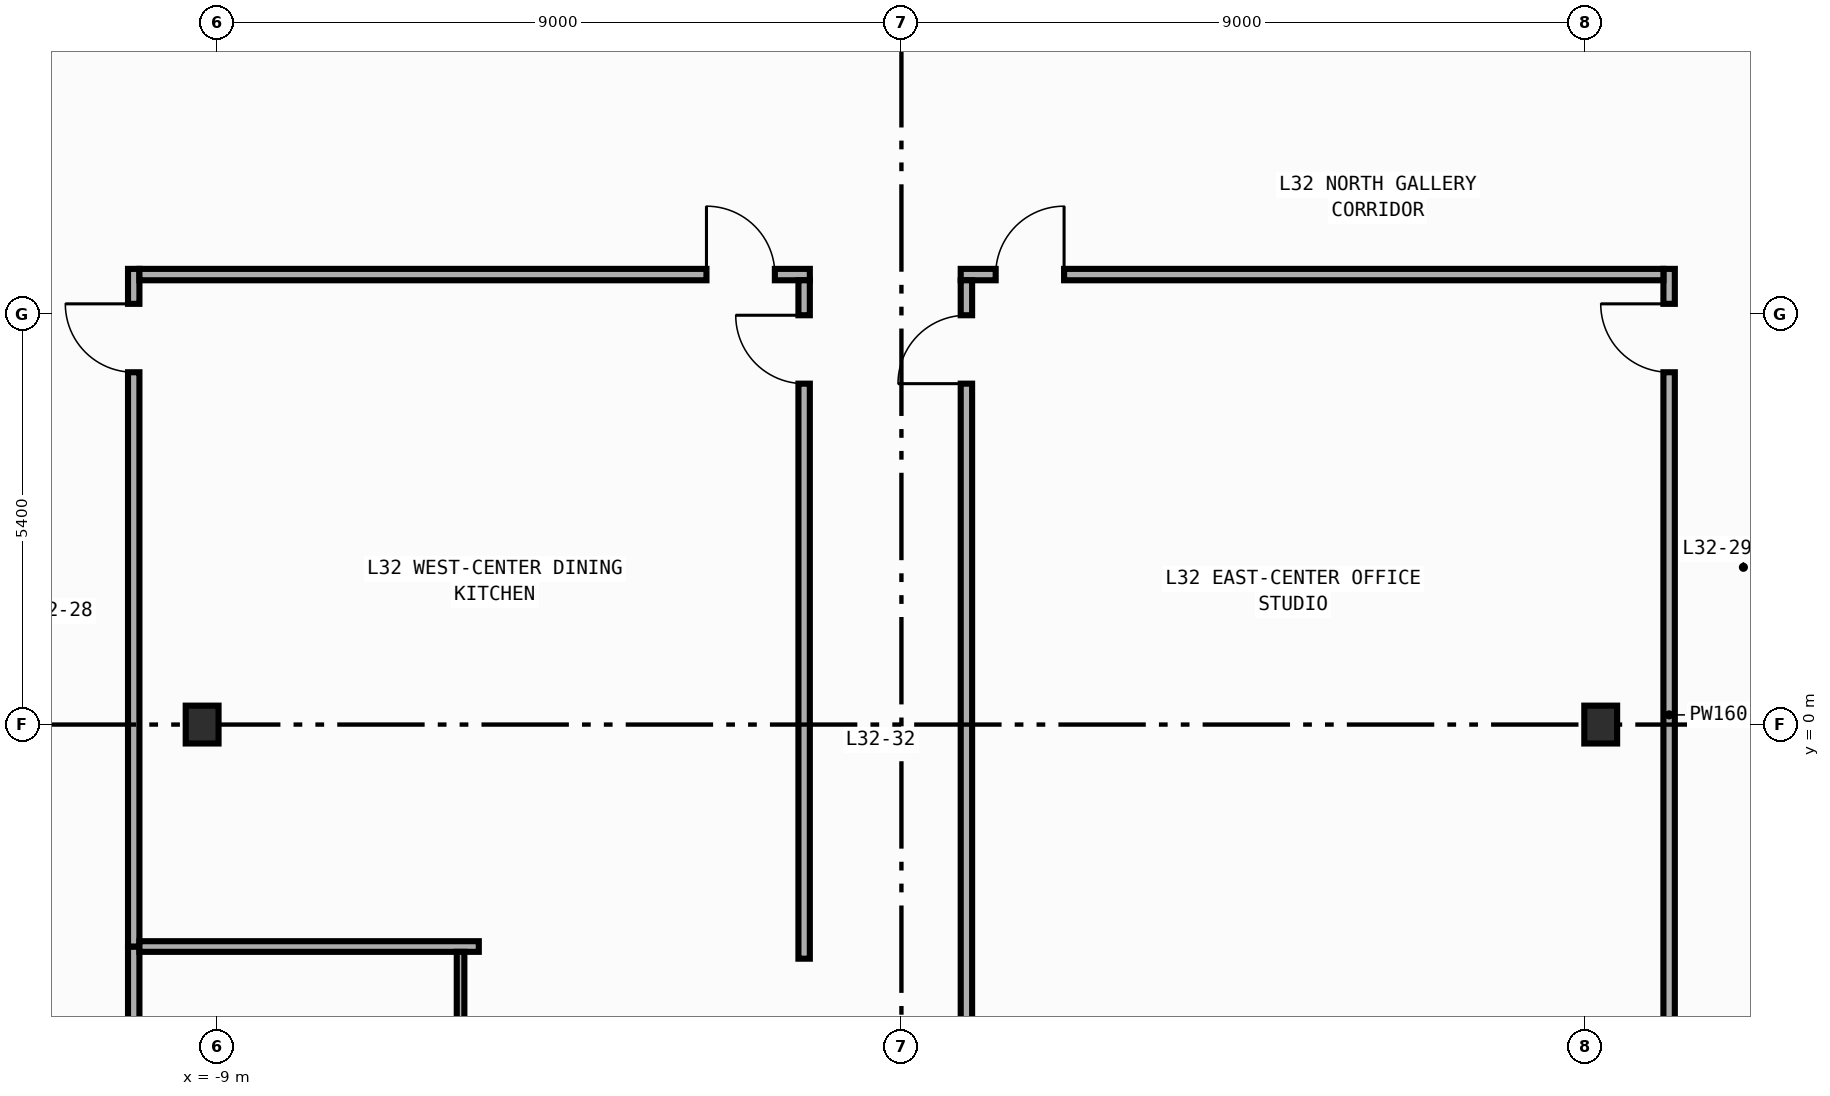
"""IFC4 building model, lengths in metres.
Left out: names, types, materials, properties, quantities, classifications, styles, units other than length and angle.
Written with IfcOpenShell. Run it as: python <this file> out.ifc"""

import sys

from ifc_helpers import new_model, si_unit, direction, frame, frame_2d, origin, origin_2d, place, context, subcontext, project, spatial, rectangle, i_section, extrude, element, fill, save


model = new_model("IFC4")
c1 = context("Model", 3, precision=1e-05, world=origin(), true_north=direction((0.0, 1.0)))
c2 = subcontext(c1, "Body", "Model", "MODEL_VIEW")
j1 = project(units=[si_unit("LENGTHUNIT", "METRE"), si_unit("PLANEANGLEUNIT", "RADIAN")], contexts=[c1])
p1 = place(None, origin())
s1 = spatial("IfcSite", under=j1, at=p1, CompositionType="ELEMENT")
p2 = place(p1, origin())
s2 = spatial("IfcBuilding", under=s1, at=p2, CompositionType="ELEMENT")
p3 = place(p2, frame((0.0, 0.0, 139.4)))
s3 = spatial("IfcBuildingStorey", under=s2, at=p3, CompositionType="ELEMENT", Elevation=139.4)
for number, where, z_axis, x_axis in (
    (1, (-9.2, 0.0, 0.0), (0.0, 0.0, 1.0), (1.0, 0.0, 0.0)),
    (2, (9.2, 0.0, 0.0), (0.0, 0.0, 1.0), (1.0, 0.0, 0.0)),
):
    element("IfcColumn", number, at=place(p3, frame(where, z_axis=z_axis, x_axis=x_axis)), inside=s3, PredefinedType="COLUMN", context=c2, shape_type="SweptSolid", body=[
        extrude(i_section(OverallWidth=0.432, OverallDepth=0.498, WebThickness=0.045, FlangeThickness=0.07, FilletRadius=0.022, at=origin_2d()), origin(), (0.0, 0.0, 1.0), 4.2),
    ])
p4 = place(p3, frame((-10.1, -7.195, 0.0), z_axis=(0.0, 0.0, 1.0), x_axis=(0.0, 1.0, 0.0)))
e3 = element("IfcWall", 3, at=p4, inside=s3, PredefinedType="PARTITIONING", context=c2, shape_type="SweptSolid", body=[
    extrude(rectangle(XDim=4.275, YDim=0.15, at=frame_2d((2.138, 0.0))), origin(), (0.0, 0.0, 1.0), 3.94),
])
p5 = place(p4, frame((1.278, 0.0, 0.0)))
e4 = element("IfcOpeningElement", 4, at=p5, cuts=e3, PredefinedType="OPENING", context=c2, shape_type="SweptSolid", body=[
    extrude(rectangle(XDim=0.9, YDim=2.15, at=frame_2d((0.45, 1.075))), frame((0.0, 0.085, 0.0), z_axis=(0.0, -1.0, 0.0), x_axis=(1.0, 0.0, 0.0)), (0.0, 0.0, 1.0), 0.17),
])
p6 = place(p3, frame((-10.1, -2.92, 0.0), z_axis=(0.0, 0.0, 1.0), x_axis=(0.0, 1.0, 0.0)))
e5 = element("IfcWall", 5, at=p6, inside=s3, PredefinedType="PARTITIONING", context=c2, shape_type="SweptSolid", body=[
    extrude(rectangle(XDim=8.915, YDim=0.15, at=frame_2d((4.458, 0.0))), origin(), (0.0, 0.0, 1.0), 3.94),
])
p7 = place(p6, frame((7.555, 0.0, 0.0)))
e6 = element("IfcOpeningElement", 6, at=p7, cuts=e5, PredefinedType="OPENING", context=c2, shape_type="SweptSolid", body=[
    extrude(rectangle(XDim=0.9, YDim=2.15, at=frame_2d((0.45, 1.075))), frame((0.0, 0.085, 0.0), z_axis=(0.0, -1.0, 0.0), x_axis=(1.0, 0.0, 0.0)), (0.0, 0.0, 1.0), 0.17),
])
p8 = place(p3, frame((10.1, -4.38, 0.0), z_axis=(0.0, 0.0, 1.0), x_axis=(0.0, 1.0, 0.0)))
e7 = element("IfcWall", 7, at=p8, inside=s3, PredefinedType="PARTITIONING", context=c2, shape_type="SweptSolid", body=[
    extrude(rectangle(XDim=10.375, YDim=0.15, at=frame_2d((5.188, 0.0))), origin(), (0.0, 0.0, 1.0), 3.94),
])
p9 = place(p8, frame((9.015, 0.0, 0.0)))
e8 = element("IfcOpeningElement", 8, at=p9, cuts=e7, PredefinedType="OPENING", context=c2, shape_type="SweptSolid", body=[
    extrude(rectangle(XDim=0.9, YDim=2.15, at=frame_2d((0.45, 1.075))), frame((0.0, 0.085, 0.0), z_axis=(0.0, -1.0, 0.0), x_axis=(1.0, 0.0, 0.0)), (0.0, 0.0, 1.0), 0.17),
])
p10 = place(p3, frame((0.78, 5.92, 0.0), z_axis=(0.0, 0.0, 1.0), x_axis=(1.0, 0.0, 0.0)))
e9 = element("IfcWall", 9, at=p10, inside=s3, PredefinedType="PARTITIONING", context=c2, shape_type="SweptSolid", body=[
    extrude(rectangle(XDim=9.245, YDim=0.15, at=frame_2d((4.623, 0.0))), origin(), (0.0, 0.0, 1.0), 3.94),
])
p11 = place(p10, frame((0.46, 0.0, 0.0)))
e10 = element("IfcOpeningElement", 10, at=p11, cuts=e9, PredefinedType="OPENING", context=c2, shape_type="SweptSolid", body=[
    extrude(rectangle(XDim=0.9, YDim=2.15, at=frame_2d((0.45, 1.075))), frame((0.0, 0.085, 0.0), z_axis=(0.0, -1.0, 0.0), x_axis=(1.0, 0.0, 0.0)), (0.0, 0.0, 1.0), 0.17),
])
p12 = place(p3, frame((-10.025, 5.92, 0.0), z_axis=(0.0, 0.0, 1.0), x_axis=(1.0, 0.0, 0.0)))
e11 = element("IfcWall", 11, at=p12, inside=s3, PredefinedType="PARTITIONING", context=c2, shape_type="SweptSolid", body=[
    extrude(rectangle(XDim=8.82, YDim=0.15, at=frame_2d((4.41, 0.0))), origin(), (0.0, 0.0, 1.0), 3.94),
])
p13 = place(p12, frame((7.46, 0.0, 0.0)))
e12 = element("IfcOpeningElement", 12, at=p13, cuts=e11, PredefinedType="OPENING", context=c2, shape_type="SweptSolid", body=[
    extrude(rectangle(XDim=0.9, YDim=2.15, at=frame_2d((0.45, 1.075))), frame((0.0, 0.085, 0.0), z_axis=(0.0, -1.0, 0.0), x_axis=(1.0, 0.0, 0.0)), (0.0, 0.0, 1.0), 0.17),
])
p14 = place(p3, frame((0.855, -4.22, 0.0), z_axis=(0.0, 0.0, 1.0), x_axis=(0.0, 1.0, 0.0)))
e13 = element("IfcWall", 13, at=p14, inside=s3, PredefinedType="PARTITIONING", context=c2, shape_type="SweptSolid", body=[
    extrude(rectangle(XDim=10.065, YDim=0.15, at=frame_2d((5.032, 0.0))), origin(), (0.0, 0.0, 1.0), 3.94),
])
p15 = place(p14, frame((8.705, 0.0, 0.0)))
e14 = element("IfcOpeningElement", 14, at=p15, cuts=e13, PredefinedType="OPENING", context=c2, shape_type="SweptSolid", body=[
    extrude(rectangle(XDim=0.9, YDim=2.15, at=frame_2d((0.45, 1.075))), frame((0.0, 0.085, 0.0), z_axis=(0.0, -1.0, 0.0), x_axis=(1.0, 0.0, 0.0)), (0.0, 0.0, 1.0), 0.17),
])
p16 = place(p3, frame((-1.28, -3.08, 0.0), z_axis=(0.0, 0.0, 1.0), x_axis=(0.0, 1.0, 0.0)))
e15 = element("IfcWall", 15, at=p16, inside=s3, PredefinedType="PARTITIONING", context=c2, shape_type="SweptSolid", body=[
    extrude(rectangle(XDim=8.925, YDim=0.15, at=frame_2d((4.462, 0.0))), origin(), (0.0, 0.0, 1.0), 3.94),
])
p17 = place(p16, frame((7.565, 0.0, 0.0)))
e16 = element("IfcOpeningElement", 16, at=p17, cuts=e15, PredefinedType="OPENING", context=c2, shape_type="SweptSolid", body=[
    extrude(rectangle(XDim=0.9, YDim=2.15, at=frame_2d((0.45, 1.075))), frame((0.0, 0.085, 0.0), z_axis=(0.0, -1.0, 0.0), x_axis=(1.0, 0.0, 0.0)), (0.0, 0.0, 1.0), 0.17),
])
p18 = place(p3, frame((-10.025, -2.92, 0.0), z_axis=(0.0, 0.0, 1.0), x_axis=(1.0, 0.0, 0.0)))
e17 = element("IfcWall", 17, at=p18, inside=s3, PredefinedType="PARTITIONING", context=c2, shape_type="SweptSolid", body=[
    extrude(rectangle(XDim=4.465, YDim=0.14, at=frame_2d((2.232, 0.0))), origin(), (0.0, 0.0, 1.0), 3.94),
])
p19 = place(p3, frame((-5.8, -2.99, 0.0), z_axis=(0.0, 0.0, 1.0), x_axis=(0.0, -1.0, 0.0)))
e18 = element("IfcWall", 18, at=p19, inside=s3, PredefinedType="PARTITIONING", context=c2, shape_type="SweptSolid", body=[
    extrude(rectangle(XDim=4.055, YDim=0.1, at=frame_2d((2.027, 0.0))), origin(), (0.0, 0.0, 1.0), 3.94),
])
p20 = place(p7, origin())
e19 = element("IfcDoor", 19, at=p20, inside=s3, OperationType="SINGLE_SWING_RIGHT", PredefinedType="DOOR", context=c2, shape_type="SweptSolid", body=[
    extrude(rectangle(XDim=0.9, YDim=2.15, at=frame_2d((0.45, 1.075))), frame((0.0, 0.025, 0.0), z_axis=(0.0, -1.0, 0.0), x_axis=(1.0, 0.0, 0.0)), (0.0, 0.0, 1.0), 0.05),
])
fill(e6, e19)
p21 = place(p9, origin())
e20 = element("IfcDoor", 20, at=p21, inside=s3, OperationType="SINGLE_SWING_RIGHT", PredefinedType="DOOR", context=c2, shape_type="SweptSolid", body=[
    extrude(rectangle(XDim=0.9, YDim=2.15, at=frame_2d((0.45, 1.075))), frame((0.0, 0.025, 0.0), z_axis=(0.0, -1.0, 0.0), x_axis=(1.0, 0.0, 0.0)), (0.0, 0.0, 1.0), 0.05),
])
fill(e8, e20)
p22 = place(p11, origin())
e21 = element("IfcDoor", 21, at=p22, inside=s3, OperationType="SINGLE_SWING_RIGHT", PredefinedType="DOOR", context=c2, shape_type="SweptSolid", body=[
    extrude(rectangle(XDim=0.9, YDim=2.15, at=frame_2d((0.45, 1.075))), frame((0.0, 0.025, 0.0), z_axis=(0.0, -1.0, 0.0), x_axis=(1.0, 0.0, 0.0)), (0.0, 0.0, 1.0), 0.05),
])
fill(e10, e21)
p23 = place(p13, origin())
e22 = element("IfcDoor", 22, at=p23, inside=s3, OperationType="SINGLE_SWING_LEFT", PredefinedType="DOOR", context=c2, shape_type="SweptSolid", body=[
    extrude(rectangle(XDim=0.9, YDim=2.15, at=frame_2d((0.45, 1.075))), frame((0.0, 0.025, 0.0), z_axis=(0.0, -1.0, 0.0), x_axis=(1.0, 0.0, 0.0)), (0.0, 0.0, 1.0), 0.05),
])
fill(e12, e22)
p24 = place(p15, origin())
e23 = element("IfcDoor", 23, at=p24, inside=s3, OperationType="SINGLE_SWING_LEFT", PredefinedType="DOOR", context=c2, shape_type="SweptSolid", body=[
    extrude(rectangle(XDim=0.9, YDim=2.15, at=frame_2d((0.45, 1.075))), frame((0.0, 0.025, 0.0), z_axis=(0.0, -1.0, 0.0), x_axis=(1.0, 0.0, 0.0)), (0.0, 0.0, 1.0), 0.05),
])
fill(e14, e23)
p25 = place(p17, origin())
e24 = element("IfcDoor", 24, at=p25, inside=s3, OperationType="SINGLE_SWING_RIGHT", PredefinedType="DOOR", context=c2, shape_type="SweptSolid", body=[
    extrude(rectangle(XDim=0.9, YDim=2.15, at=frame_2d((0.45, 1.075))), frame((0.0, 0.025, 0.0), z_axis=(0.0, -1.0, 0.0), x_axis=(1.0, 0.0, 0.0)), (0.0, 0.0, 1.0), 0.05),
])
fill(e16, e24)
save(model, sys.argv[1])
